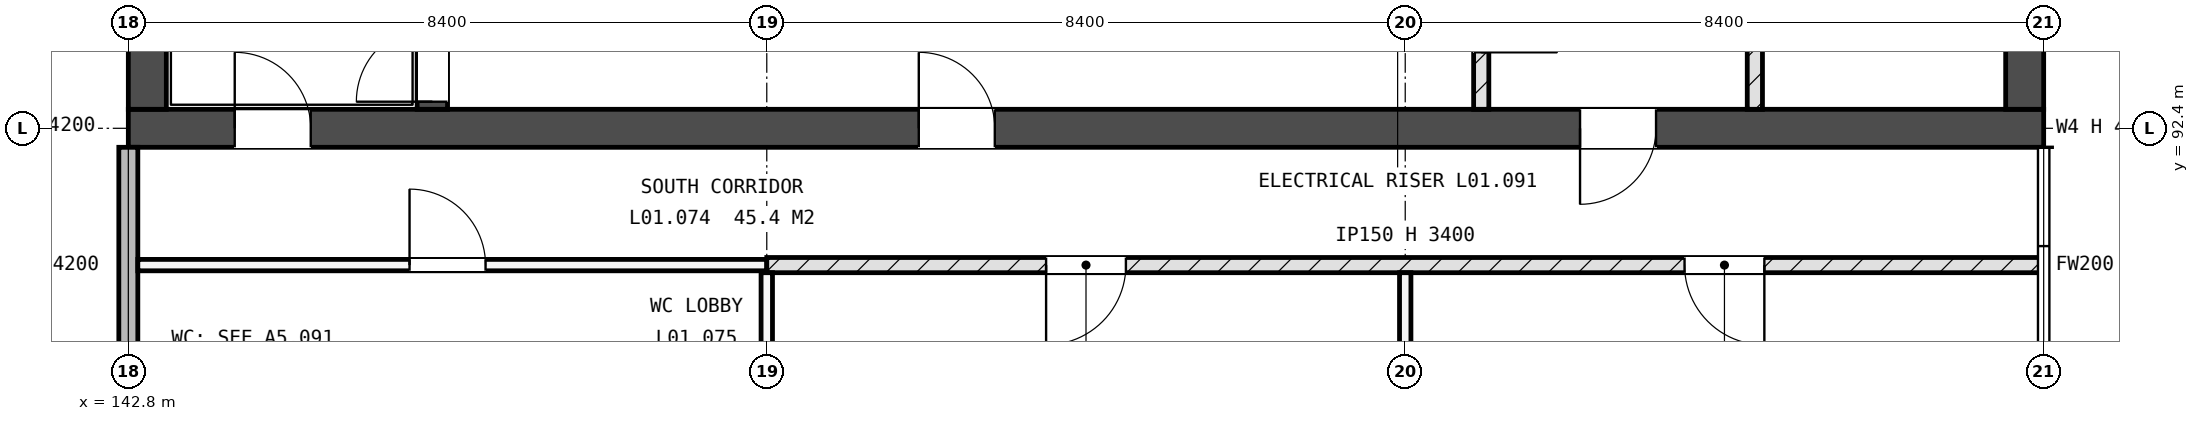
"""IFC4 building model, lengths in metres.
Left out: names, types, materials, properties, quantities, classifications, styles, units other than length and angle.
Written with IfcOpenShell. Run it as: python <this file> out.ifc"""

import sys

from ifc_helpers import new_model, si_unit, direction, frame, frame_2d, origin, place, context, subcontext, project, spatial, rectangle, extrude, element, fill, save


model = new_model("IFC4")
c1 = context("Model", 3, precision=1e-05, world=origin(), true_north=direction((0.0, 1.0)))
c2 = subcontext(c1, "Body", "Model", "MODEL_VIEW")
j1 = project(units=[si_unit("LENGTHUNIT", "METRE"), si_unit("PLANEANGLEUNIT", "RADIAN")], contexts=[c1])
p1 = place(None, origin())
s1 = spatial("IfcSite", under=j1, at=p1, CompositionType="ELEMENT")
p2 = place(p1, origin())
s2 = spatial("IfcBuilding", under=s1, at=p2, CompositionType="ELEMENT")
p3 = place(p2, frame((0.0, 0.0, 5.4)))
s3 = spatial("IfcBuildingStorey", under=s2, at=p3, CompositionType="ELEMENT", Elevation=5.4)
p4 = place(p3, frame((142.8, 92.4, -0.3), z_axis=(0.0, 0.0, 1.0), x_axis=(1.0, 0.0, 0.0)))
e1 = element("IfcWall", 1, at=p4, inside=s3, PredefinedType="SHEAR", context=c2, shape_type="SweptSolid", body=[
    extrude(rectangle(XDim=25.2, YDim=0.5, at=frame_2d((12.6, 0.0))), origin(), (0.0, 0.0, 1.0), 4.55),
])
p5 = place(p4, frame((1.4, 0.0, 0.3)))
e2 = element("IfcOpeningElement", 2, at=p5, cuts=e1, PredefinedType="OPENING", context=c2, shape_type="SweptSolid", body=[
    extrude(rectangle(XDim=1.0, YDim=2.1, at=frame_2d((0.5, 1.05))), frame((0.0, 0.26, 0.0), z_axis=(0.0, -1.0, 0.0), x_axis=(1.0, 0.0, 0.0)), (0.0, 0.0, 1.0), 0.52),
])
p6 = place(p4, frame((19.1, 0.0, 0.3)))
e3 = element("IfcOpeningElement", 3, at=p6, cuts=e1, PredefinedType="OPENING", context=c2, shape_type="SweptSolid", body=[
    extrude(rectangle(XDim=1.0, YDim=2.1, at=frame_2d((0.5, 1.05))), frame((0.0, 0.26, 0.0), z_axis=(0.0, -1.0, 0.0), x_axis=(1.0, 0.0, 0.0)), (0.0, 0.0, 1.0), 0.52),
])
p7 = place(p4, frame((10.4, 0.0, 0.3)))
e4 = element("IfcOpeningElement", 4, at=p7, cuts=e1, PredefinedType="OPENING", context=c2, shape_type="SweptSolid", body=[
    extrude(rectangle(XDim=1.0, YDim=2.1, at=frame_2d((0.5, 1.05))), frame((0.0, 0.26, 0.0), z_axis=(0.0, -1.0, 0.0), x_axis=(1.0, 0.0, 0.0)), (0.0, 0.0, 1.0), 0.52),
])
p8 = place(p3, frame((143.05, 92.65, -0.3), z_axis=(0.0, 0.0, 1.0), x_axis=(0.0, 1.0, 0.0)))
e5 = element("IfcWall", 5, at=p8, inside=s3, PredefinedType="SHEAR", context=c2, shape_type="SweptSolid", body=[
    extrude(rectangle(XDim=16.3, YDim=0.5, at=frame_2d((8.15, 0.0))), origin(), (0.0, 0.0, 1.0), 4.55),
])
p9 = place(p8, frame((2.95, 0.0, 1.9)))
e6 = element("IfcOpeningElement", 6, at=p9, cuts=e5, PredefinedType="OPENING", context=c2, shape_type="SweptSolid", body=[
    extrude(rectangle(XDim=1.2, YDim=0.9, at=frame_2d((0.6, 0.45))), frame((0.0, 0.26, 0.0), z_axis=(0.0, -1.0, 0.0), x_axis=(1.0, 0.0, 0.0)), (0.0, 0.0, 1.0), 0.52),
])
p10 = place(p3, frame((167.75, 92.65, -0.3), z_axis=(0.0, 0.0, 1.0), x_axis=(0.0, 1.0, 0.0)))
e7 = element("IfcWall", 7, at=p10, inside=s3, PredefinedType="SHEAR", context=c2, shape_type="SweptSolid", body=[
    extrude(rectangle(XDim=16.3, YDim=0.5, at=frame_2d((8.15, 0.0))), origin(), (0.0, 0.0, 1.0), 4.55),
])
p11 = place(p10, frame((12.15, 0.0, 1.9)))
e8 = element("IfcOpeningElement", 8, at=p11, cuts=e7, PredefinedType="OPENING", context=c2, shape_type="SweptSolid", body=[
    extrude(rectangle(XDim=1.2, YDim=0.9, at=frame_2d((0.6, 0.45))), frame((0.0, 0.26, 0.0), z_axis=(0.0, -1.0, 0.0), x_axis=(1.0, 0.0, 0.0)), (0.0, 0.0, 1.0), 0.52),
])
p12 = place(p3, frame((146.8, 92.65, -0.3), z_axis=(0.0, 0.0, 1.0), x_axis=(0.0, 1.0, 0.0)))
e9 = element("IfcWall", 9, at=p12, inside=s3, PredefinedType="SHEAR", context=c2, shape_type="SweptSolid", body=[
    extrude(rectangle(XDim=7.475, YDim=0.4, at=frame_2d((3.738, 0.0))), origin(), (0.0, 0.0, 1.0), 4.55),
])
p13 = place(p12, frame((0.1, 0.0, 0.3)))
e10 = element("IfcOpeningElement", 10, at=p13, cuts=e9, PredefinedType="OPENING", context=c2, shape_type="SweptSolid", body=[
    extrude(rectangle(XDim=1.0, YDim=2.1, at=frame_2d((0.5, 1.05))), frame((0.0, 0.21, 0.0), z_axis=(0.0, -1.0, 0.0), x_axis=(1.0, 0.0, 0.0)), (0.0, 0.0, 1.0), 0.42),
])
p14 = place(p3, frame((142.8, 84.55, 0.0), z_axis=(0.0, 0.0, 1.0), x_axis=(0.0, 1.0, 0.0)))
e11 = element("IfcWall", 11, at=p14, inside=s3, PredefinedType="STANDARD", context=c2, shape_type="SweptSolid", body=[
    extrude(rectangle(XDim=7.6, YDim=0.25, at=frame_2d((3.8, 0.0))), origin(), (0.0, 0.0, 1.0), 4.2),
])
p15 = place(p14, frame((2.15, 0.0, 2.1)))
e12 = element("IfcOpeningElement", 12, at=p15, cuts=e11, PredefinedType="OPENING", context=c2, shape_type="SweptSolid", body=[
    extrude(rectangle(XDim=0.9, YDim=0.6, at=frame_2d((0.45, 0.3))), frame((0.0, 0.135, 0.0), z_axis=(0.0, -1.0, 0.0), x_axis=(1.0, 0.0, 0.0)), (0.0, 0.0, 1.0), 0.27),
])
p16 = place(p3, frame((142.925, 90.6, 0.0), z_axis=(0.0, 0.0, 1.0), x_axis=(1.0, 0.0, 0.0)))
e13 = element("IfcWall", 13, at=p16, inside=s3, PredefinedType="PARTITIONING", context=c2, shape_type="SweptSolid", body=[
    extrude(rectangle(XDim=8.275, YDim=0.15, at=frame_2d((4.137, 0.0))), origin(), (0.0, 0.0, 1.0), 4.2),
])
p17 = place(p16, frame((3.575, 0.0, 0.0)))
e14 = element("IfcOpeningElement", 14, at=p17, cuts=e13, PredefinedType="OPENING", context=c2, shape_type="SweptSolid", body=[
    extrude(rectangle(XDim=1.0, YDim=2.1, at=frame_2d((0.5, 1.05))), frame((0.0, 0.085, 0.0), z_axis=(0.0, -1.0, 0.0), x_axis=(1.0, 0.0, 0.0)), (0.0, 0.0, 1.0), 0.17),
])
p18 = place(p3, frame((151.2, 90.6, 0.0), z_axis=(0.0, 0.0, 1.0), x_axis=(1.0, 0.0, 0.0)))
e15 = element("IfcWall", 15, at=p18, inside=s3, PredefinedType="SOLIDWALL", context=c2, shape_type="SweptSolid", body=[
    extrude(rectangle(XDim=16.8, YDim=0.2, at=frame_2d((8.4, 0.0))), origin(), (0.0, 0.0, 1.0), 4.2),
])
p19 = place(p18, frame((3.675, 0.0, 0.0)))
e16 = element("IfcOpeningElement", 16, at=p19, cuts=e15, PredefinedType="OPENING", context=c2, shape_type="SweptSolid", body=[
    extrude(rectangle(XDim=1.05, YDim=2.1, at=frame_2d((0.525, 1.05))), frame((0.0, 0.11, 0.0), z_axis=(0.0, -1.0, 0.0), x_axis=(1.0, 0.0, 0.0)), (0.0, 0.0, 1.0), 0.22),
])
p20 = place(p18, frame((12.075, 0.0, 0.0)))
e17 = element("IfcOpeningElement", 17, at=p20, cuts=e15, PredefinedType="OPENING", context=c2, shape_type="SweptSolid", body=[
    extrude(rectangle(XDim=1.05, YDim=2.1, at=frame_2d((0.525, 1.05))), frame((0.0, 0.11, 0.0), z_axis=(0.0, -1.0, 0.0), x_axis=(1.0, 0.0, 0.0)), (0.0, 0.0, 1.0), 0.22),
])
for number, where, z_axis, x_axis in (
    (18, (151.2, 84.0, 0.0), (0.0, 0.0, 1.0), (0.0, 1.0, 0.0)),
    (19, (159.6, 84.0, 0.0), (0.0, 0.0, 1.0), (0.0, 1.0, 0.0)),
):
    element("IfcWall", number, at=place(p3, frame(where, z_axis=z_axis, x_axis=x_axis)), inside=s3, PredefinedType="PARTITIONING", context=c2, shape_type="SweptSolid", body=[
        extrude(rectangle(XDim=6.5, YDim=0.15, at=frame_2d((3.25, 0.0))), origin(), (0.0, 0.0, 1.0), 3.4),
    ])
p21 = place(p3, frame((160.6, 92.65, 0.0), z_axis=(0.0, 0.0, 1.0), x_axis=(0.0, 1.0, 0.0)))
e20 = element("IfcWall", 20, at=p21, inside=s3, PredefinedType="SOLIDWALL", context=c2, shape_type="SweptSolid", body=[
    extrude(rectangle(XDim=12.45, YDim=0.2, at=frame_2d((6.225, 0.0))), origin(), (0.0, 0.0, 1.0), 4.2),
])
p22 = place(p21, frame((5.05, 0.0, 0.0)))
e21 = element("IfcOpeningElement", 21, at=p22, cuts=e20, PredefinedType="OPENING", context=c2, shape_type="SweptSolid", body=[
    extrude(rectangle(XDim=0.8, YDim=2.1, at=frame_2d((0.4, 1.05))), frame((0.0, 0.11, 0.0), z_axis=(0.0, -1.0, 0.0), x_axis=(1.0, 0.0, 0.0)), (0.0, 0.0, 1.0), 0.22),
])
p23 = place(p21, frame((0.75, 0.0, 0.0)))
e22 = element("IfcOpeningElement", 22, at=p23, cuts=e20, PredefinedType="OPENING", context=c2, shape_type="SweptSolid", body=[
    extrude(rectangle(XDim=1.0, YDim=2.1, at=frame_2d((0.5, 1.05))), frame((0.0, 0.11, 0.0), z_axis=(0.0, -1.0, 0.0), x_axis=(1.0, 0.0, 0.0)), (0.0, 0.0, 1.0), 0.22),
])
p24 = place(p3, frame((164.2, 92.65, 0.0), z_axis=(0.0, 0.0, 1.0), x_axis=(0.0, 1.0, 0.0)))
e23 = element("IfcWall", 23, at=p24, inside=s3, PredefinedType="SOLIDWALL", context=c2, shape_type="SweptSolid", body=[
    extrude(rectangle(XDim=8.7, YDim=0.2, at=frame_2d((4.35, 0.0))), origin(), (0.0, 0.0, 1.0), 4.2),
])
p25 = place(p24, frame((1.65, 0.0, 0.0)))
e24 = element("IfcOpeningElement", 24, at=p25, cuts=e23, PredefinedType="OPENING", context=c2, shape_type="SweptSolid", body=[
    extrude(rectangle(XDim=0.8, YDim=2.1, at=frame_2d((0.4, 1.05))), frame((0.0, 0.11, 0.0), z_axis=(0.0, -1.0, 0.0), x_axis=(1.0, 0.0, 0.0)), (0.0, 0.0, 1.0), 0.22),
])
p26 = place(p24, frame((6.25, 0.0, 0.0)))
e25 = element("IfcOpeningElement", 25, at=p26, cuts=e23, PredefinedType="OPENING", context=c2, shape_type="SweptSolid", body=[
    extrude(rectangle(XDim=0.8, YDim=2.1, at=frame_2d((0.4, 1.05))), frame((0.0, 0.11, 0.0), z_axis=(0.0, -1.0, 0.0), x_axis=(1.0, 0.0, 0.0)), (0.0, 0.0, 1.0), 0.22),
])
p27 = place(p5, origin())
e26 = element("IfcDoor", 26, at=p27, inside=s3, OperationType="SINGLE_SWING_RIGHT", PredefinedType="DOOR", context=c2, shape_type="SweptSolid", body=[
    extrude(rectangle(XDim=1.0, YDim=2.1, at=frame_2d((0.5, 1.05))), frame((0.0, 0.025, 0.0), z_axis=(0.0, -1.0, 0.0), x_axis=(1.0, 0.0, 0.0)), (0.0, 0.0, 1.0), 0.05),
])
fill(e2, e26)
p28 = place(p13, origin())
e27 = element("IfcDoor", 27, at=p28, inside=s3, OperationType="SINGLE_SWING_RIGHT", PredefinedType="DOOR", context=c2, shape_type="SweptSolid", body=[
    extrude(rectangle(XDim=1.0, YDim=2.1, at=frame_2d((0.5, 1.05))), frame((0.0, 0.025, 0.0), z_axis=(0.0, -1.0, 0.0), x_axis=(1.0, 0.0, 0.0)), (0.0, 0.0, 1.0), 0.05),
])
fill(e10, e27)
p29 = place(p19, origin())
e28 = element("IfcDoor", 28, at=p29, inside=s3, OperationType="SINGLE_SWING_LEFT", PredefinedType="DOOR", context=c2, shape_type="SweptSolid", body=[
    extrude(rectangle(XDim=1.05, YDim=2.1, at=frame_2d((0.525, 1.05))), frame((0.0, 0.025, 0.0), z_axis=(0.0, -1.0, 0.0), x_axis=(1.0, 0.0, 0.0)), (0.0, 0.0, 1.0), 0.05),
])
fill(e16, e28)
p30 = place(p20, origin())
e29 = element("IfcDoor", 29, at=p30, inside=s3, OperationType="SINGLE_SWING_RIGHT", PredefinedType="DOOR", context=c2, shape_type="SweptSolid", body=[
    extrude(rectangle(XDim=1.05, YDim=2.1, at=frame_2d((0.525, 1.05))), frame((0.0, 0.025, 0.0), z_axis=(0.0, -1.0, 0.0), x_axis=(1.0, 0.0, 0.0)), (0.0, 0.0, 1.0), 0.05),
])
fill(e17, e29)
p31 = place(p17, origin())
e30 = element("IfcDoor", 30, at=p31, inside=s3, OperationType="SINGLE_SWING_RIGHT", PredefinedType="DOOR", context=c2, shape_type="SweptSolid", body=[
    extrude(rectangle(XDim=1.0, YDim=2.1, at=frame_2d((0.5, 1.05))), frame((0.0, 0.025, 0.0), z_axis=(0.0, -1.0, 0.0), x_axis=(1.0, 0.0, 0.0)), (0.0, 0.0, 1.0), 0.05),
])
fill(e14, e30)
p32 = place(p6, origin())
e31 = element("IfcDoor", 31, at=p32, inside=s3, OperationType="SINGLE_SWING_LEFT", PredefinedType="DOOR", context=c2, shape_type="SweptSolid", body=[
    extrude(rectangle(XDim=1.0, YDim=2.1, at=frame_2d((0.5, 1.05))), frame((0.0, 0.025, 0.0), z_axis=(0.0, -1.0, 0.0), x_axis=(1.0, 0.0, 0.0)), (0.0, 0.0, 1.0), 0.05),
])
fill(e3, e31)
p33 = place(p7, origin())
e32 = element("IfcDoor", 32, at=p33, inside=s3, OperationType="SINGLE_SWING_RIGHT", PredefinedType="DOOR", context=c2, shape_type="SweptSolid", body=[
    extrude(rectangle(XDim=1.0, YDim=2.1, at=frame_2d((0.5, 1.05))), frame((0.0, 0.025, 0.0), z_axis=(0.0, -1.0, 0.0), x_axis=(1.0, 0.0, 0.0)), (0.0, 0.0, 1.0), 0.05),
])
fill(e4, e32)
save(model, sys.argv[1])
